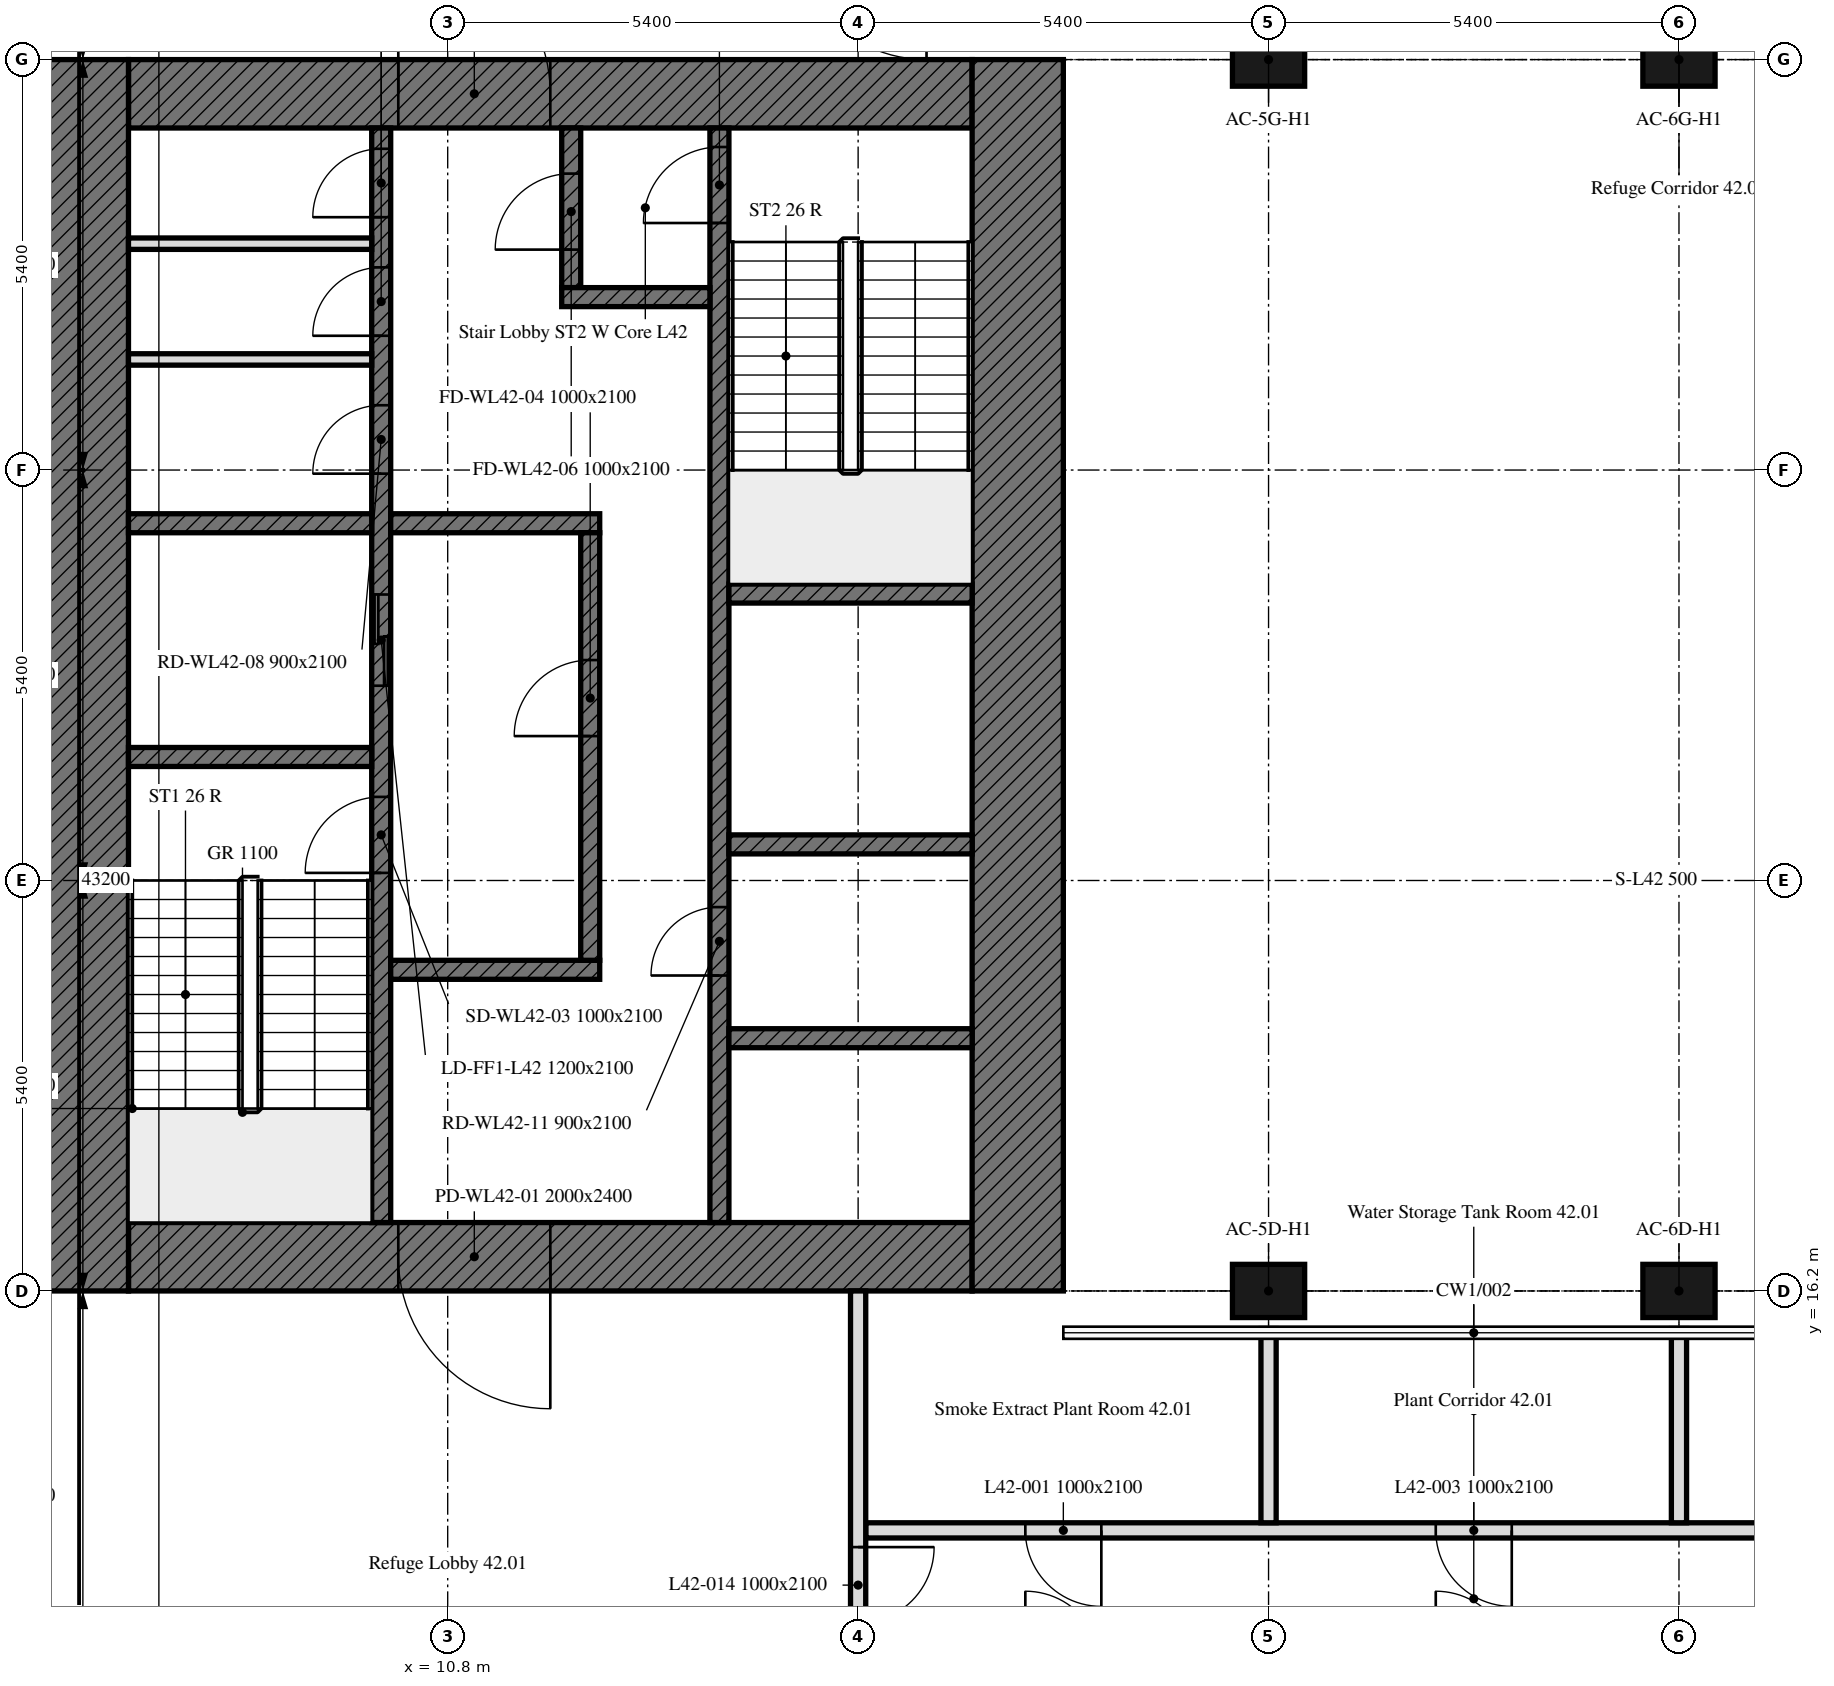
"""IFC4 building model, lengths in metres.
Left out: names, types, materials, properties, quantities, classifications, styles, units other than length and angle.
Written with IfcOpenShell. Run it as: python <this file> out.ifc"""

import sys

from ifc_helpers import new_model, si_unit, direction, frame, frame_2d, origin, origin_2d, place, context, subcontext, project, spatial, rectangle, extrude, element, fill, save


model = new_model("IFC4")
c1 = context("Model", 3, precision=1e-05, world=origin(), true_north=direction((0.0, 1.0)))
c2 = subcontext(c1, "Body", "Model", "MODEL_VIEW")
j1 = project(units=[si_unit("LENGTHUNIT", "METRE"), si_unit("PLANEANGLEUNIT", "RADIAN")], contexts=[c1])
p1 = place(None, origin())
s1 = spatial("IfcSite", under=j1, at=p1, CompositionType="ELEMENT")
p2 = place(p1, origin())
s2 = spatial("IfcBuilding", under=s1, at=p2, CompositionType="ELEMENT")
p3 = place(p2, frame((0.0, 0.0, 175.9)))
s3 = spatial("IfcBuildingStorey", under=s2, at=p3, CompositionType="ELEMENT", Elevation=175.9)
for number, where, z_axis, x_axis in (
    (1, (21.6, 16.2, 0.0), (0.0, 0.0, 1.0), (1.0, 0.0, 0.0)),
    (2, (27.0, 16.2, 0.0), (0.0, 0.0, 1.0), (1.0, 0.0, 0.0)),
    (3, (21.6, 32.4, 0.0), (0.0, 0.0, 1.0), (1.0, 0.0, 0.0)),
    (4, (27.0, 32.4, 0.0), (0.0, 0.0, 1.0), (1.0, 0.0, 0.0)),
):
    element("IfcColumn", number, at=place(p3, frame(where, z_axis=z_axis, x_axis=x_axis)), inside=s3, PredefinedType="COLUMN", context=c2, shape_type="SweptSolid", body=[
        extrude(rectangle(XDim=0.95, YDim=0.7, at=origin_2d()), origin(), (0.0, 0.0, 1.0), 4.5),
    ])
p4 = place(p3, frame((17.7, 16.65, 0.0), z_axis=(0.0, 0.0, 1.0), x_axis=(-1.0, 0.0, 0.0)))
e5 = element("IfcWall", 5, at=p4, inside=s3, PredefinedType="SOLIDWALL", context=c2, shape_type="SweptSolid", body=[
    extrude(rectangle(XDim=11.1, YDim=0.9, at=frame_2d((5.55, 0.0))), origin(), (0.0, 0.0, 1.0), 4.5),
])
p5 = place(p4, frame((5.55, 0.0, 0.0)))
e6 = element("IfcOpeningElement", 6, at=p5, cuts=e5, PredefinedType="OPENING", context=c2, shape_type="SweptSolid", body=[
    extrude(rectangle(XDim=2.0, YDim=2.4, at=frame_2d((1.0, 1.2))), frame((0.0, 0.45, 0.0), z_axis=(0.0, -1.0, 0.0), x_axis=(1.0, 0.0, 0.0)), (0.0, 0.0, 1.0), 0.9),
])
p6 = place(p3, frame((6.6, 31.95, 0.0), z_axis=(0.0, 0.0, 1.0), x_axis=(1.0, 0.0, 0.0)))
e7 = element("IfcWall", 7, at=p6, inside=s3, PredefinedType="SOLIDWALL", context=c2, shape_type="SweptSolid", body=[
    extrude(rectangle(XDim=11.1, YDim=0.9, at=frame_2d((5.55, 0.0))), origin(), (0.0, 0.0, 1.0), 4.5),
])
p7 = place(p6, frame((3.55, 0.0, 0.0)))
e8 = element("IfcOpeningElement", 8, at=p7, cuts=e7, PredefinedType="OPENING", context=c2, shape_type="SweptSolid", body=[
    extrude(rectangle(XDim=2.0, YDim=2.4, at=frame_2d((1.0, 1.2))), frame((0.0, 0.45, 0.0), z_axis=(0.0, -1.0, 0.0), x_axis=(1.0, 0.0, 0.0)), (0.0, 0.0, 1.0), 0.9),
])
for number, where, z_axis, x_axis in (
    (9, (6.0, 16.2, 0.0), (0.0, 0.0, 1.0), (0.0, 1.0, 0.0)),
    (10, (18.3, 32.4, 0.0), (0.0, 0.0, 1.0), (0.0, -1.0, 0.0)),
):
    element("IfcWall", number, at=place(p3, frame(where, z_axis=z_axis, x_axis=x_axis)), inside=s3, PredefinedType="SOLIDWALL", context=c2, shape_type="SweptSolid", body=[
        extrude(rectangle(XDim=16.2, YDim=1.2, at=frame_2d((8.1, 0.0))), origin(), (0.0, 0.0, 1.0), 4.5),
    ])
p8 = place(p3, frame((9.925, 17.1, 0.0), z_axis=(0.0, 0.0, 1.0), x_axis=(0.0, 1.0, 0.0)))
e11 = element("IfcWall", 11, at=p8, inside=s3, PredefinedType="SOLIDWALL", context=c2, shape_type="SweptSolid", body=[
    extrude(rectangle(XDim=14.4, YDim=0.25, at=frame_2d((7.2, 0.0))), origin(), (0.0, 0.0, 1.0), 4.5),
])
p9 = place(p8, frame((4.6, 0.0, 0.0)))
e12 = element("IfcOpeningElement", 12, at=p9, cuts=e11, PredefinedType="OPENING", context=c2, shape_type="SweptSolid", body=[
    extrude(rectangle(XDim=1.0, YDim=2.1, at=frame_2d((0.5, 1.05))), frame((0.0, 0.125, 0.0), z_axis=(0.0, -1.0, 0.0), x_axis=(1.0, 0.0, 0.0)), (0.0, 0.0, 1.0), 0.25),
])
p10 = place(p8, frame((7.062, 0.0, 0.0)))
e13 = element("IfcOpeningElement", 13, at=p10, cuts=e11, PredefinedType="OPENING", context=c2, shape_type="SweptSolid", body=[
    extrude(rectangle(XDim=1.2, YDim=2.1, at=frame_2d((0.6, 1.05))), frame((0.0, 0.125, 0.0), z_axis=(0.0, -1.0, 0.0), x_axis=(1.0, 0.0, 0.0)), (0.0, 0.0, 1.0), 0.25),
])
p11 = place(p8, frame((9.853, 0.0, 0.0)))
e14 = element("IfcOpeningElement", 14, at=p11, cuts=e11, PredefinedType="OPENING", context=c2, shape_type="SweptSolid", body=[
    extrude(rectangle(XDim=0.9, YDim=2.1, at=frame_2d((0.45, 1.05))), frame((0.0, 0.125, 0.0), z_axis=(0.0, -1.0, 0.0), x_axis=(1.0, 0.0, 0.0)), (0.0, 0.0, 1.0), 0.25),
])
p12 = place(p8, frame((11.667, 0.0, 0.0)))
e15 = element("IfcOpeningElement", 15, at=p12, cuts=e11, PredefinedType="OPENING", context=c2, shape_type="SweptSolid", body=[
    extrude(rectangle(XDim=0.9, YDim=2.1, at=frame_2d((0.45, 1.05))), frame((0.0, 0.125, 0.0), z_axis=(0.0, -1.0, 0.0), x_axis=(1.0, 0.0, 0.0)), (0.0, 0.0, 1.0), 0.25),
])
p13 = place(p8, frame((13.227, 0.0, 0.0)))
e16 = element("IfcOpeningElement", 16, at=p13, cuts=e11, PredefinedType="OPENING", context=c2, shape_type="SweptSolid", body=[
    extrude(rectangle(XDim=0.9, YDim=2.1, at=frame_2d((0.45, 1.05))), frame((0.0, 0.125, 0.0), z_axis=(0.0, -1.0, 0.0), x_axis=(1.0, 0.0, 0.0)), (0.0, 0.0, 1.0), 0.25),
])
p14 = place(p3, frame((14.375, 17.1, 0.0), z_axis=(0.0, 0.0, 1.0), x_axis=(0.0, 1.0, 0.0)))
e17 = element("IfcWall", 17, at=p14, inside=s3, PredefinedType="SOLIDWALL", context=c2, shape_type="SweptSolid", body=[
    extrude(rectangle(XDim=14.4, YDim=0.25, at=frame_2d((7.2, 0.0))), origin(), (0.0, 0.0, 1.0), 4.5),
])
p15 = place(p14, frame((13.15, 0.0, 0.0)))
e18 = element("IfcOpeningElement", 18, at=p15, cuts=e17, PredefinedType="OPENING", context=c2, shape_type="SweptSolid", body=[
    extrude(rectangle(XDim=1.0, YDim=2.1, at=frame_2d((0.5, 1.05))), frame((0.0, 0.125, 0.0), z_axis=(0.0, -1.0, 0.0), x_axis=(1.0, 0.0, 0.0)), (0.0, 0.0, 1.0), 0.25),
])
p16 = place(p14, frame((3.25, 0.0, 0.0)))
e19 = element("IfcOpeningElement", 19, at=p16, cuts=e17, PredefinedType="OPENING", context=c2, shape_type="SweptSolid", body=[
    extrude(rectangle(XDim=0.9, YDim=2.1, at=frame_2d((0.45, 1.05))), frame((0.0, 0.125, 0.0), z_axis=(0.0, -1.0, 0.0), x_axis=(1.0, 0.0, 0.0)), (0.0, 0.0, 1.0), 0.25),
])
for number, where, z_axis, x_axis in (
    (20, (6.6, 23.225, 0.0), (0.0, 0.0, 1.0), (1.0, 0.0, 0.0)),
    (21, (14.5, 25.375, 0.0), (0.0, 0.0, 1.0), (1.0, 0.0, 0.0)),
    (22, (14.5, 22.075, 0.0), (0.0, 0.0, 1.0), (1.0, 0.0, 0.0)),
    (23, (6.6, 26.3, 0.0), (0.0, 0.0, 1.0), (1.0, 0.0, 0.0)),
):
    element("IfcWall", number, at=place(p3, frame(where, z_axis=z_axis, x_axis=x_axis)), inside=s3, PredefinedType="SOLIDWALL", context=c2, shape_type="SweptSolid", body=[
        extrude(rectangle(XDim=3.2, YDim=0.25, at=frame_2d((1.6, 0.0))), origin(), (0.0, 0.0, 1.0), 4.5),
    ])
for number, where, z_axis, x_axis in (
    (24, (10.05, 26.3, 0.0), (0.0, 0.0, 1.0), (1.0, 0.0, 0.0)),
    (25, (10.05, 20.425, 0.0), (0.0, 0.0, 1.0), (1.0, 0.0, 0.0)),
):
    element("IfcWall", number, at=place(p3, frame(where, z_axis=z_axis, x_axis=x_axis)), inside=s3, PredefinedType="SOLIDWALL", context=c2, shape_type="SweptSolid", body=[
        extrude(rectangle(XDim=2.75, YDim=0.25, at=frame_2d((1.375, 0.0))), origin(), (0.0, 0.0, 1.0), 4.5),
    ])
p17 = place(p3, frame((12.425, 29.4, 0.0), z_axis=(0.0, 0.0, 1.0), x_axis=(0.0, 1.0, 0.0)))
e26 = element("IfcWall", 26, at=p17, inside=s3, PredefinedType="SOLIDWALL", context=c2, shape_type="SweptSolid", body=[
    extrude(rectangle(XDim=2.1, YDim=0.25, at=frame_2d((1.05, 0.0))), origin(), (0.0, 0.0, 1.0), 4.5),
])
p18 = place(p17, frame((0.5, 0.0, 0.0)))
e27 = element("IfcOpeningElement", 27, at=p18, cuts=e26, PredefinedType="OPENING", context=c2, shape_type="SweptSolid", body=[
    extrude(rectangle(XDim=1.0, YDim=2.1, at=frame_2d((0.5, 1.05))), frame((0.0, 0.125, 0.0), z_axis=(0.0, -1.0, 0.0), x_axis=(1.0, 0.0, 0.0)), (0.0, 0.0, 1.0), 0.25),
])
p19 = place(p3, frame((12.3, 29.275, 0.0), z_axis=(0.0, 0.0, 1.0), x_axis=(1.0, 0.0, 0.0)))
e28 = element("IfcWall", 28, at=p19, inside=s3, PredefinedType="SOLIDWALL", context=c2, shape_type="SweptSolid", body=[
    extrude(rectangle(XDim=1.95, YDim=0.25, at=frame_2d((0.975, 0.0))), origin(), (0.0, 0.0, 1.0), 4.5),
])
p20 = place(p3, frame((12.675, 20.55, 0.0), z_axis=(0.0, 0.0, 1.0), x_axis=(0.0, 1.0, 0.0)))
e29 = element("IfcWall", 29, at=p20, inside=s3, PredefinedType="SOLIDWALL", context=c2, shape_type="SweptSolid", body=[
    extrude(rectangle(XDim=5.625, YDim=0.25, at=frame_2d((2.812, 0.0))), origin(), (0.0, 0.0, 1.0), 4.5),
])
p21 = place(p20, frame((2.95, 0.0, 0.0)))
e30 = element("IfcOpeningElement", 30, at=p21, cuts=e29, PredefinedType="OPENING", context=c2, shape_type="SweptSolid", body=[
    extrude(rectangle(XDim=1.0, YDim=2.1, at=frame_2d((0.5, 1.05))), frame((0.0, 0.125, 0.0), z_axis=(0.0, -1.0, 0.0), x_axis=(1.0, 0.0, 0.0)), (0.0, 0.0, 1.0), 0.25),
])
p22 = place(p3, frame((14.5, 19.525, 0.0), z_axis=(0.0, 0.0, 1.0), x_axis=(1.0, 0.0, 0.0)))
e31 = element("IfcWall", 31, at=p22, inside=s3, PredefinedType="SOLIDWALL", context=c2, shape_type="SweptSolid", body=[
    extrude(rectangle(XDim=3.2, YDim=0.25, at=frame_2d((1.6, 0.0))), origin(), (0.0, 0.0, 1.0), 4.5),
])
for number, where, z_axis, x_axis in (
    (32, (6.6, 28.455, 0.0), (0.0, 0.0, 1.0), (1.0, 0.0, 0.0)),
    (33, (6.6, 29.978, 0.0), (0.0, 0.0, 1.0), (1.0, 0.0, 0.0)),
):
    element("IfcWall", number, at=place(p3, frame(where, z_axis=z_axis, x_axis=x_axis)), inside=s3, PredefinedType="PARTITIONING", context=c2, shape_type="SweptSolid", body=[
        extrude(rectangle(XDim=3.2, YDim=0.15, at=frame_2d((1.6, 0.0))), origin(), (0.0, 0.0, 1.0), 4.5),
    ])
p23 = place(p3, frame((32.3, 13.05, 0.0), z_axis=(0.0, 0.0, 1.0), x_axis=(-1.0, 0.0, 0.0)))
e34 = element("IfcWall", 34, at=p23, inside=s3, PredefinedType="PARTITIONING", context=c2, shape_type="SweptSolid", body=[
    extrude(rectangle(XDim=16.0, YDim=0.2, at=frame_2d((8.0, 0.0))), origin(), (0.0, 0.0, 1.0), 3.9),
])
p24 = place(p23, frame((12.9, 0.0, 0.0)))
e35 = element("IfcOpeningElement", 35, at=p24, cuts=e34, PredefinedType="OPENING", context=c2, shape_type="SweptSolid", body=[
    extrude(rectangle(XDim=1.0, YDim=2.1, at=frame_2d((0.5, 1.05))), frame((0.0, 0.1, 0.0), z_axis=(0.0, -1.0, 0.0), x_axis=(1.0, 0.0, 0.0)), (0.0, 0.0, 1.0), 0.2),
])
p25 = place(p23, frame((7.5, 0.0, 0.0)))
e36 = element("IfcOpeningElement", 36, at=p25, cuts=e34, PredefinedType="OPENING", context=c2, shape_type="SweptSolid", body=[
    extrude(rectangle(XDim=1.0, YDim=2.1, at=frame_2d((0.5, 1.05))), frame((0.0, 0.1, 0.0), z_axis=(0.0, -1.0, 0.0), x_axis=(1.0, 0.0, 0.0)), (0.0, 0.0, 1.0), 0.2),
])
p26 = place(p23, frame((2.1, 0.0, 0.0)))
e37 = element("IfcOpeningElement", 37, at=p26, cuts=e34, PredefinedType="OPENING", context=c2, shape_type="SweptSolid", body=[
    extrude(rectangle(XDim=1.0, YDim=2.1, at=frame_2d((0.5, 1.05))), frame((0.0, 0.1, 0.0), z_axis=(0.0, -1.0, 0.0), x_axis=(1.0, 0.0, 0.0)), (0.0, 0.0, 1.0), 0.2),
])
p27 = place(p3, frame((16.2, 16.2, 0.0), z_axis=(0.0, 0.0, 1.0), x_axis=(0.0, -1.0, 0.0)))
e38 = element("IfcWall", 38, at=p27, inside=s3, PredefinedType="PARTITIONING", context=c2, shape_type="SweptSolid", body=[
    extrude(rectangle(XDim=4.874, YDim=0.2, at=frame_2d((2.437, 0.0))), origin(), (0.0, 0.0, 1.0), 3.9),
])
p28 = place(p27, frame((3.37, 0.0, 0.0)))
e39 = element("IfcOpeningElement", 39, at=p28, cuts=e38, PredefinedType="OPENING", context=c2, shape_type="SweptSolid", body=[
    extrude(rectangle(XDim=1.0, YDim=2.1, at=frame_2d((0.5, 1.05))), frame((0.0, 0.1, 0.0), z_axis=(0.0, -1.0, 0.0), x_axis=(1.0, 0.0, 0.0)), (0.0, 0.0, 1.0), 0.2),
])
for number, where, z_axis, x_axis in (
    (40, (21.6, 13.15, 0.0), (0.0, 0.0, 1.0), (0.0, 1.0, 0.0)),
    (41, (27.0, 13.15, 0.0), (0.0, 0.0, 1.0), (0.0, 1.0, 0.0)),
):
    element("IfcWall", number, at=place(p3, frame(where, z_axis=z_axis, x_axis=x_axis)), inside=s3, PredefinedType="PARTITIONING", context=c2, shape_type="SweptSolid", body=[
        extrude(rectangle(XDim=2.555, YDim=0.2, at=frame_2d((1.278, 0.0))), origin(), (0.0, 0.0, 1.0), 3.9),
    ])
p29 = place(p5, origin())
e42 = element("IfcDoor", 42, at=p29, inside=s3, OperationType="DOUBLE_DOOR_SINGLE_SWING", PredefinedType="DOOR", context=c2, shape_type="SweptSolid", body=[
    extrude(rectangle(XDim=2.0, YDim=2.4, at=frame_2d((1.0, 1.2))), frame((0.0, 0.025, 0.0), z_axis=(0.0, -1.0, 0.0), x_axis=(1.0, 0.0, 0.0)), (0.0, 0.0, 1.0), 0.05),
])
fill(e6, e42)
p30 = place(p7, origin())
e43 = element("IfcDoor", 43, at=p30, inside=s3, OperationType="DOUBLE_DOOR_SINGLE_SWING", PredefinedType="DOOR", context=c2, shape_type="SweptSolid", body=[
    extrude(rectangle(XDim=2.0, YDim=2.4, at=frame_2d((1.0, 1.2))), frame((0.0, 0.025, 0.0), z_axis=(0.0, -1.0, 0.0), x_axis=(1.0, 0.0, 0.0)), (0.0, 0.0, 1.0), 0.05),
])
fill(e8, e43)
p31 = place(p9, origin())
e44 = element("IfcDoor", 44, at=p31, inside=s3, OperationType="SINGLE_SWING_LEFT", PredefinedType="DOOR", context=c2, shape_type="SweptSolid", body=[
    extrude(rectangle(XDim=1.0, YDim=2.1, at=frame_2d((0.5, 1.05))), frame((0.0, 0.025, 0.0), z_axis=(0.0, -1.0, 0.0), x_axis=(1.0, 0.0, 0.0)), (0.0, 0.0, 1.0), 0.05),
])
fill(e12, e44)
p32 = place(p21, origin())
e45 = element("IfcDoor", 45, at=p32, inside=s3, OperationType="SINGLE_SWING_LEFT", PredefinedType="DOOR", context=c2, shape_type="SweptSolid", body=[
    extrude(rectangle(XDim=1.0, YDim=2.1, at=frame_2d((0.5, 1.05))), frame((0.0, 0.025, 0.0), z_axis=(0.0, -1.0, 0.0), x_axis=(1.0, 0.0, 0.0)), (0.0, 0.0, 1.0), 0.05),
])
fill(e30, e45)
p33 = place(p15, origin())
e46 = element("IfcDoor", 46, at=p33, inside=s3, OperationType="SINGLE_SWING_LEFT", PredefinedType="DOOR", context=c2, shape_type="SweptSolid", body=[
    extrude(rectangle(XDim=1.0, YDim=2.1, at=frame_2d((0.5, 1.05))), frame((0.0, 0.025, 0.0), z_axis=(0.0, -1.0, 0.0), x_axis=(1.0, 0.0, 0.0)), (0.0, 0.0, 1.0), 0.05),
])
fill(e18, e46)
p34 = place(p18, origin())
e47 = element("IfcDoor", 47, at=p34, inside=s3, OperationType="SINGLE_SWING_LEFT", PredefinedType="DOOR", context=c2, shape_type="SweptSolid", body=[
    extrude(rectangle(XDim=1.0, YDim=2.1, at=frame_2d((0.5, 1.05))), frame((0.0, 0.025, 0.0), z_axis=(0.0, -1.0, 0.0), x_axis=(1.0, 0.0, 0.0)), (0.0, 0.0, 1.0), 0.05),
])
fill(e27, e47)
p35 = place(p10, origin())
e48 = element("IfcDoor", 48, at=p35, inside=s3, OperationType="DOUBLE_DOOR_SLIDING", PredefinedType="DOOR", context=c2, shape_type="SweptSolid", body=[
    extrude(rectangle(XDim=1.2, YDim=2.1, at=frame_2d((0.6, 1.05))), frame((0.0, 0.025, 0.0), z_axis=(0.0, -1.0, 0.0), x_axis=(1.0, 0.0, 0.0)), (0.0, 0.0, 1.0), 0.05),
])
fill(e13, e48)
p36 = place(p11, origin())
e49 = element("IfcDoor", 49, at=p36, inside=s3, OperationType="SINGLE_SWING_LEFT", PredefinedType="DOOR", context=c2, shape_type="SweptSolid", body=[
    extrude(rectangle(XDim=0.9, YDim=2.1, at=frame_2d((0.45, 1.05))), frame((0.0, 0.025, 0.0), z_axis=(0.0, -1.0, 0.0), x_axis=(1.0, 0.0, 0.0)), (0.0, 0.0, 1.0), 0.05),
])
fill(e14, e49)
p37 = place(p12, origin())
e50 = element("IfcDoor", 50, at=p37, inside=s3, OperationType="SINGLE_SWING_LEFT", PredefinedType="DOOR", context=c2, shape_type="SweptSolid", body=[
    extrude(rectangle(XDim=0.9, YDim=2.1, at=frame_2d((0.45, 1.05))), frame((0.0, 0.025, 0.0), z_axis=(0.0, -1.0, 0.0), x_axis=(1.0, 0.0, 0.0)), (0.0, 0.0, 1.0), 0.05),
])
fill(e15, e50)
p38 = place(p13, origin())
e51 = element("IfcDoor", 51, at=p38, inside=s3, OperationType="SINGLE_SWING_LEFT", PredefinedType="DOOR", context=c2, shape_type="SweptSolid", body=[
    extrude(rectangle(XDim=0.9, YDim=2.1, at=frame_2d((0.45, 1.05))), frame((0.0, 0.025, 0.0), z_axis=(0.0, -1.0, 0.0), x_axis=(1.0, 0.0, 0.0)), (0.0, 0.0, 1.0), 0.05),
])
fill(e16, e51)
p39 = place(p16, origin())
e52 = element("IfcDoor", 52, at=p39, inside=s3, OperationType="SINGLE_SWING_LEFT", PredefinedType="DOOR", context=c2, shape_type="SweptSolid", body=[
    extrude(rectangle(XDim=0.9, YDim=2.1, at=frame_2d((0.45, 1.05))), frame((0.0, 0.025, 0.0), z_axis=(0.0, -1.0, 0.0), x_axis=(1.0, 0.0, 0.0)), (0.0, 0.0, 1.0), 0.05),
])
fill(e19, e52)
p40 = place(p24, origin())
e53 = element("IfcDoor", 53, at=p40, inside=s3, OperationType="SINGLE_SWING_LEFT", PredefinedType="DOOR", context=c2, shape_type="SweptSolid", body=[
    extrude(rectangle(XDim=1.0, YDim=2.1, at=frame_2d((0.5, 1.05))), frame((0.0, 0.025, 0.0), z_axis=(0.0, -1.0, 0.0), x_axis=(1.0, 0.0, 0.0)), (0.0, 0.0, 1.0), 0.05),
])
fill(e35, e53)
p41 = place(p25, origin())
e54 = element("IfcDoor", 54, at=p41, inside=s3, OperationType="SINGLE_SWING_LEFT", PredefinedType="DOOR", context=c2, shape_type="SweptSolid", body=[
    extrude(rectangle(XDim=1.0, YDim=2.1, at=frame_2d((0.5, 1.05))), frame((0.0, 0.025, 0.0), z_axis=(0.0, -1.0, 0.0), x_axis=(1.0, 0.0, 0.0)), (0.0, 0.0, 1.0), 0.05),
])
fill(e36, e54)
p42 = place(p28, origin())
e55 = element("IfcDoor", 55, at=p42, inside=s3, OperationType="SINGLE_SWING_RIGHT", PredefinedType="DOOR", context=c2, shape_type="SweptSolid", body=[
    extrude(rectangle(XDim=1.0, YDim=2.1, at=frame_2d((0.5, 1.05))), frame((0.0, 0.025, 0.0), z_axis=(0.0, -1.0, 0.0), x_axis=(1.0, 0.0, 0.0)), (0.0, 0.0, 1.0), 0.05),
])
fill(e39, e55)
save(model, sys.argv[1])
